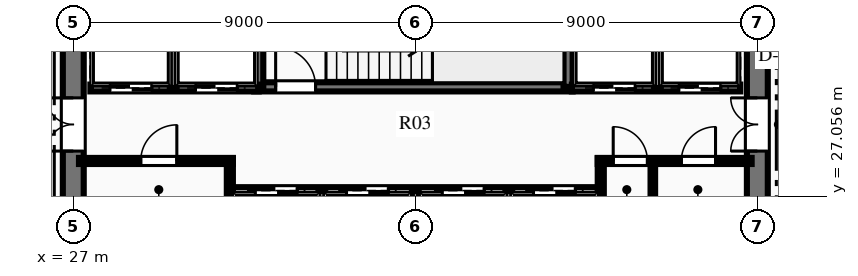
"""IFC4 building model, lengths in metres.
Left out: names, types, materials, properties, quantities, classifications, styles, units other than length and angle.
Written with IfcOpenShell. Run it as: python <this file> out.ifc"""

import sys

from ifc_helpers import new_model, si_unit, direction, frame, frame_2d, origin, place, context, subcontext, project, spatial, rectangle, extrude, element, fill, save


model = new_model("IFC4")
c1 = context("Model", 3, precision=1e-05, world=origin(), true_north=direction((0.0, 1.0)))
c2 = subcontext(c1, "Body", "Model", "MODEL_VIEW")
j1 = project(units=[si_unit("LENGTHUNIT", "METRE"), si_unit("PLANEANGLEUNIT", "RADIAN")], contexts=[c1])
p1 = place(None, origin())
s1 = spatial("IfcSite", under=j1, at=p1, CompositionType="ELEMENT")
p2 = place(p1, origin())
s2 = spatial("IfcBuilding", under=s1, at=p2, CompositionType="ELEMENT")
p3 = place(p2, frame((0.0, 0.0, 127.95)))
s3 = spatial("IfcBuildingStorey", under=s2, at=p3, CompositionType="ELEMENT", Elevation=127.95)
p4 = place(p3, frame((27.0, 18.275, 0.0), z_axis=(0.0, 0.0, 1.0), x_axis=(0.0, 1.0, 0.0)))
e1 = element("IfcWall", 1, at=p4, inside=s3, PredefinedType="SHEAR", context=c2, shape_type="SweptSolid", body=[
    extrude(rectangle(XDim=15.45, YDim=0.55, at=frame_2d((7.725, 0.0))), origin(), (0.0, 0.0, 1.0), 3.75),
])
p5 = place(p4, frame((9.965, 0.0, 0.0)))
e2 = element("IfcOpeningElement", 2, at=p5, cuts=e1, PredefinedType="OPENING", context=c2, shape_type="SweptSolid", body=[
    extrude(rectangle(XDim=1.4, YDim=2.2, at=frame_2d((0.7, 1.1))), frame((0.0, 0.285, 0.0), z_axis=(0.0, -1.0, 0.0), x_axis=(1.0, 0.0, 0.0)), (0.0, 0.0, 1.0), 0.57),
])
p6 = place(p3, frame((45.0, 18.275, 0.0), z_axis=(0.0, 0.0, 1.0), x_axis=(0.0, 1.0, 0.0)))
e3 = element("IfcWall", 3, at=p6, inside=s3, PredefinedType="SHEAR", context=c2, shape_type="SweptSolid", body=[
    extrude(rectangle(XDim=15.45, YDim=0.55, at=frame_2d((7.725, 0.0))), origin(), (0.0, 0.0, 1.0), 3.75),
])
p7 = place(p6, frame((9.965, 0.0, 0.0)))
e4 = element("IfcOpeningElement", 4, at=p7, cuts=e3, PredefinedType="OPENING", context=c2, shape_type="SweptSolid", body=[
    extrude(rectangle(XDim=1.4, YDim=2.2, at=frame_2d((0.7, 1.1))), frame((0.0, 0.285, 0.0), z_axis=(0.0, -1.0, 0.0), x_axis=(1.0, 0.0, 0.0)), (0.0, 0.0, 1.0), 0.57),
])
p8 = place(p3, frame((31.76, 29.93, 0.0), z_axis=(0.0, 0.0, 1.0), x_axis=(1.0, 0.0, 0.0)))
e5 = element("IfcWall", 5, at=p8, inside=s3, PredefinedType="SHEAR", context=c2, shape_type="SweptSolid", body=[
    extrude(rectangle(XDim=8.38, YDim=0.24, at=frame_2d((4.19, 0.0))), origin(), (0.0, 0.0, 1.0), 3.75),
])
p9 = place(p8, frame((0.565, 0.0, 0.0)))
e6 = element("IfcOpeningElement", 6, at=p9, cuts=e5, PredefinedType="OPENING", context=c2, shape_type="SweptSolid", body=[
    extrude(rectangle(XDim=1.05, YDim=2.15, at=frame_2d((0.525, 1.075))), frame((0.0, 0.13, 0.0), z_axis=(0.0, -1.0, 0.0), x_axis=(1.0, 0.0, 0.0)), (0.0, 0.0, 1.0), 0.26),
])
p10 = place(p3, frame((31.88, 29.93, 0.0), z_axis=(0.0, 0.0, 1.0), x_axis=(0.0, 1.0, 0.0)))
e7 = element("IfcWall", 7, at=p10, inside=s3, PredefinedType="SHEAR", context=c2, shape_type="SweptSolid", body=[
    extrude(rectangle(XDim=3.79, YDim=0.24, at=frame_2d((1.895, 0.0))), origin(), (0.0, 0.0, 1.0), 3.75),
])
p11 = place(p3, frame((40.02, 29.93, 0.0), z_axis=(0.0, 0.0, 1.0), x_axis=(0.0, 1.0, 0.0)))
e8 = element("IfcWall", 8, at=p11, inside=s3, PredefinedType="SHEAR", context=c2, shape_type="SweptSolid", body=[
    extrude(rectangle(XDim=3.85, YDim=0.24, at=frame_2d((1.925, 0.0))), origin(), (0.0, 0.0, 1.0), 3.75),
])
p12 = place(p3, frame((27.15, 27.98, 0.0), z_axis=(0.0, 0.0, 1.0), x_axis=(1.0, 0.0, 0.0)))
e9 = element("IfcWall", 9, at=p12, inside=s3, PredefinedType="PARTITIONING", context=c2, shape_type="SweptSolid", body=[
    extrude(rectangle(XDim=4.05, YDim=0.16, at=frame_2d((2.025, 0.0))), origin(), (0.0, 0.0, 1.0), 3.4),
])
p13 = place(p12, frame((1.625, 0.0, 0.0)))
e10 = element("IfcOpeningElement", 10, at=p13, cuts=e9, PredefinedType="OPENING", context=c2, shape_type="SweptSolid", body=[
    extrude(rectangle(XDim=0.95, YDim=2.15, at=frame_2d((0.475, 1.075))), frame((0.0, 0.09, 0.0), z_axis=(0.0, -1.0, 0.0), x_axis=(1.0, 0.0, 0.0)), (0.0, 0.0, 1.0), 0.18),
])
p14 = place(p3, frame((31.12, 26.54, 0.0), z_axis=(0.0, 0.0, 1.0), x_axis=(0.0, 1.0, 0.0)))
e11 = element("IfcWall", 11, at=p14, inside=s3, PredefinedType="PARTITIONING", context=c2, shape_type="SweptSolid", body=[
    extrude(rectangle(XDim=1.51, YDim=0.16, at=frame_2d((0.755, 0.0))), origin(), (0.0, 0.0, 1.0), 3.4),
])
p15 = place(p3, frame((40.8, 27.98, 0.0), z_axis=(0.0, 0.0, 1.0), x_axis=(1.0, 0.0, 0.0)))
e12 = element("IfcWall", 12, at=p15, inside=s3, PredefinedType="PARTITIONING", context=c2, shape_type="SweptSolid", body=[
    extrude(rectangle(XDim=4.05, YDim=0.16, at=frame_2d((2.025, 0.0))), origin(), (0.0, 0.0, 1.0), 3.4),
])
p16 = place(p15, frame((0.407, 0.0, 0.0)))
e13 = element("IfcOpeningElement", 13, at=p16, cuts=e12, PredefinedType="OPENING", context=c2, shape_type="SweptSolid", body=[
    extrude(rectangle(XDim=0.9, YDim=2.15, at=frame_2d((0.45, 1.075))), frame((0.0, 0.09, 0.0), z_axis=(0.0, -1.0, 0.0), x_axis=(1.0, 0.0, 0.0)), (0.0, 0.0, 1.0), 0.18),
])
p17 = place(p15, frame((2.2, 0.0, 0.0)))
e14 = element("IfcOpeningElement", 14, at=p17, cuts=e12, PredefinedType="OPENING", context=c2, shape_type="SweptSolid", body=[
    extrude(rectangle(XDim=0.9, YDim=2.15, at=frame_2d((0.45, 1.075))), frame((0.0, 0.09, 0.0), z_axis=(0.0, -1.0, 0.0), x_axis=(1.0, 0.0, 0.0)), (0.0, 0.0, 1.0), 0.18),
])
p18 = place(p3, frame((40.88, 26.54, 0.0), z_axis=(0.0, 0.0, 1.0), x_axis=(0.0, 1.0, 0.0)))
e15 = element("IfcWall", 15, at=p18, inside=s3, PredefinedType="PARTITIONING", context=c2, shape_type="SweptSolid", body=[
    extrude(rectangle(XDim=1.51, YDim=0.16, at=frame_2d((0.755, 0.0))), origin(), (0.0, 0.0, 1.0), 3.4),
])
p19 = place(p3, frame((42.25, 26.54, 0.0), z_axis=(0.0, 0.0, 1.0), x_axis=(0.0, 1.0, 0.0)))
e16 = element("IfcWall", 16, at=p19, inside=s3, PredefinedType="PARTITIONING", context=c2, shape_type="SweptSolid", body=[
    extrude(rectangle(XDim=1.44, YDim=0.12, at=frame_2d((0.72, 0.0))), origin(), (0.0, 0.0, 1.0), 3.4),
])
p20 = place(p3, frame((27.45, 29.9, 0.0), z_axis=(0.0, 0.0, 1.0), x_axis=(1.0, 0.0, 0.0)))
e17 = element("IfcWall", 17, at=p20, inside=s3, PredefinedType="PARTITIONING", context=c2, shape_type="SweptSolid", body=[
    extrude(rectangle(XDim=4.43, YDim=0.18, at=frame_2d((2.215, 0.0))), origin(), (0.0, 0.0, 1.0), 3.4),
])
p21 = place(p20, frame((0.515, 0.0, 0.0)))
e18 = element("IfcOpeningElement", 18, at=p21, cuts=e17, PredefinedType="OPENING", context=c2, shape_type="SweptSolid", body=[
    extrude(rectangle(XDim=1.1, YDim=2.15, at=frame_2d((0.55, 1.075))), frame((0.0, 0.1, 0.0), z_axis=(0.0, -1.0, 0.0), x_axis=(1.0, 0.0, 0.0)), (0.0, 0.0, 1.0), 0.2),
])
p22 = place(p20, frame((2.765, 0.0, 0.0)))
e19 = element("IfcOpeningElement", 19, at=p22, cuts=e17, PredefinedType="OPENING", context=c2, shape_type="SweptSolid", body=[
    extrude(rectangle(XDim=1.1, YDim=2.15, at=frame_2d((0.55, 1.075))), frame((0.0, 0.1, 0.0), z_axis=(0.0, -1.0, 0.0), x_axis=(1.0, 0.0, 0.0)), (0.0, 0.0, 1.0), 0.2),
])
p23 = place(p3, frame((29.63, 29.9, 0.0), z_axis=(0.0, 0.0, 1.0), x_axis=(0.0, 1.0, 0.0)))
e20 = element("IfcWall", 20, at=p23, inside=s3, PredefinedType="PARTITIONING", context=c2, shape_type="SweptSolid", body=[
    extrude(rectangle(XDim=3.75, YDim=0.18, at=frame_2d((1.875, 0.0))), origin(), (0.0, 0.0, 1.0), 3.4),
])
p24 = place(p3, frame((40.12, 29.9, 0.0), z_axis=(0.0, 0.0, 1.0), x_axis=(1.0, 0.0, 0.0)))
e21 = element("IfcWall", 21, at=p24, inside=s3, PredefinedType="PARTITIONING", context=c2, shape_type="SweptSolid", body=[
    extrude(rectangle(XDim=4.43, YDim=0.18, at=frame_2d((2.215, 0.0))), origin(), (0.0, 0.0, 1.0), 3.4),
])
p25 = place(p24, frame((0.565, 0.0, 0.0)))
e22 = element("IfcOpeningElement", 22, at=p25, cuts=e21, PredefinedType="OPENING", context=c2, shape_type="SweptSolid", body=[
    extrude(rectangle(XDim=1.1, YDim=2.15, at=frame_2d((0.55, 1.075))), frame((0.0, 0.1, 0.0), z_axis=(0.0, -1.0, 0.0), x_axis=(1.0, 0.0, 0.0)), (0.0, 0.0, 1.0), 0.2),
])
p26 = place(p24, frame((2.815, 0.0, 0.0)))
e23 = element("IfcOpeningElement", 23, at=p26, cuts=e21, PredefinedType="OPENING", context=c2, shape_type="SweptSolid", body=[
    extrude(rectangle(XDim=1.1, YDim=2.15, at=frame_2d((0.55, 1.075))), frame((0.0, 0.1, 0.0), z_axis=(0.0, -1.0, 0.0), x_axis=(1.0, 0.0, 0.0)), (0.0, 0.0, 1.0), 0.2),
])
p27 = place(p3, frame((42.37, 29.9, 0.0), z_axis=(0.0, 0.0, 1.0), x_axis=(0.0, 1.0, 0.0)))
e24 = element("IfcWall", 24, at=p27, inside=s3, PredefinedType="PARTITIONING", context=c2, shape_type="SweptSolid", body=[
    extrude(rectangle(XDim=3.75, YDim=0.18, at=frame_2d((1.875, 0.0))), origin(), (0.0, 0.0, 1.0), 3.4),
])
p28 = place(p3, frame((31.2, 27.2, 0.0), z_axis=(0.0, 0.0, 1.0), x_axis=(1.0, 0.0, 0.0)))
e25 = element("IfcWall", 25, at=p28, inside=s3, PredefinedType="PARTITIONING", context=c2, shape_type="SweptSolid", body=[
    extrude(rectangle(XDim=9.6, YDim=0.18, at=frame_2d((4.8, 0.0))), origin(), (0.0, 0.0, 1.0), 3.4),
])
p29 = place(p28, frame((0.59, 0.0, 0.0)))
e26 = element("IfcOpeningElement", 26, at=p29, cuts=e25, PredefinedType="OPENING", context=c2, shape_type="SweptSolid", body=[
    extrude(rectangle(XDim=1.1, YDim=2.15, at=frame_2d((0.55, 1.075))), frame((0.0, 0.1, 0.0), z_axis=(0.0, -1.0, 0.0), x_axis=(1.0, 0.0, 0.0)), (0.0, 0.0, 1.0), 0.2),
])
p30 = place(p28, frame((2.99, 0.0, 0.0)))
e27 = element("IfcOpeningElement", 27, at=p30, cuts=e25, PredefinedType="OPENING", context=c2, shape_type="SweptSolid", body=[
    extrude(rectangle(XDim=1.1, YDim=2.15, at=frame_2d((0.55, 1.075))), frame((0.0, 0.1, 0.0), z_axis=(0.0, -1.0, 0.0), x_axis=(1.0, 0.0, 0.0)), (0.0, 0.0, 1.0), 0.2),
])
p31 = place(p28, frame((5.51, 0.0, 0.0)))
e28 = element("IfcOpeningElement", 28, at=p31, cuts=e25, PredefinedType="OPENING", context=c2, shape_type="SweptSolid", body=[
    extrude(rectangle(XDim=1.1, YDim=2.15, at=frame_2d((0.55, 1.075))), frame((0.0, 0.1, 0.0), z_axis=(0.0, -1.0, 0.0), x_axis=(1.0, 0.0, 0.0)), (0.0, 0.0, 1.0), 0.2),
])
p32 = place(p28, frame((7.91, 0.0, 0.0)))
e29 = element("IfcOpeningElement", 29, at=p32, cuts=e25, PredefinedType="OPENING", context=c2, shape_type="SweptSolid", body=[
    extrude(rectangle(XDim=1.1, YDim=2.15, at=frame_2d((0.55, 1.075))), frame((0.0, 0.1, 0.0), z_axis=(0.0, -1.0, 0.0), x_axis=(1.0, 0.0, 0.0)), (0.0, 0.0, 1.0), 0.2),
])
for number, where, z_axis, x_axis in (
    (30, (33.54, 25.3, 0.0), (0.0, 0.0, 1.0), (0.0, 1.0, 0.0)),
    (31, (36.0, 25.3, 0.0), (0.0, 0.0, 1.0), (0.0, 1.0, 0.0)),
    (32, (38.46, 25.3, 0.0), (0.0, 0.0, 1.0), (0.0, 1.0, 0.0)),
):
    element("IfcWall", number, at=place(p3, frame(where, z_axis=z_axis, x_axis=x_axis)), inside=s3, PredefinedType="PARTITIONING", context=c2, shape_type="SweptSolid", body=[
        extrude(rectangle(XDim=1.9, YDim=0.18, at=frame_2d((0.95, 0.0))), origin(), (0.0, 0.0, 1.0), 3.4),
    ])
p33 = place(p13, origin())
e33 = element("IfcDoor", 33, at=p33, inside=s3, OperationType="SINGLE_SWING_RIGHT", PredefinedType="DOOR", context=c2, shape_type="SweptSolid", body=[
    extrude(rectangle(XDim=0.95, YDim=2.15, at=frame_2d((0.475, 1.075))), frame((0.0, 0.025, 0.0), z_axis=(0.0, -1.0, 0.0), x_axis=(1.0, 0.0, 0.0)), (0.0, 0.0, 1.0), 0.05),
])
fill(e10, e33)
p34 = place(p16, origin())
e34 = element("IfcDoor", 34, at=p34, inside=s3, OperationType="SINGLE_SWING_LEFT", PredefinedType="DOOR", context=c2, shape_type="SweptSolid", body=[
    extrude(rectangle(XDim=0.9, YDim=2.15, at=frame_2d((0.45, 1.075))), frame((0.0, 0.025, 0.0), z_axis=(0.0, -1.0, 0.0), x_axis=(1.0, 0.0, 0.0)), (0.0, 0.0, 1.0), 0.05),
])
fill(e13, e34)
p35 = place(p17, origin())
e35 = element("IfcDoor", 35, at=p35, inside=s3, OperationType="SINGLE_SWING_RIGHT", PredefinedType="DOOR", context=c2, shape_type="SweptSolid", body=[
    extrude(rectangle(XDim=0.9, YDim=2.15, at=frame_2d((0.45, 1.075))), frame((0.0, 0.025, 0.0), z_axis=(0.0, -1.0, 0.0), x_axis=(1.0, 0.0, 0.0)), (0.0, 0.0, 1.0), 0.05),
])
fill(e14, e35)
p36 = place(p9, origin())
e36 = element("IfcDoor", 36, at=p36, inside=s3, OperationType="SINGLE_SWING_LEFT", PredefinedType="DOOR", context=c2, shape_type="SweptSolid", body=[
    extrude(rectangle(XDim=1.05, YDim=2.15, at=frame_2d((0.525, 1.075))), frame((0.0, 0.025, 0.0), z_axis=(0.0, -1.0, 0.0), x_axis=(1.0, 0.0, 0.0)), (0.0, 0.0, 1.0), 0.05),
])
fill(e6, e36)
p37 = place(p5, origin())
e37 = element("IfcDoor", 37, at=p37, inside=s3, OperationType="DOUBLE_DOOR_SINGLE_SWING", PredefinedType="DOOR", context=c2, shape_type="SweptSolid", body=[
    extrude(rectangle(XDim=1.4, YDim=2.2, at=frame_2d((0.7, 1.1))), frame((0.0, 0.025, 0.0), z_axis=(0.0, -1.0, 0.0), x_axis=(1.0, 0.0, 0.0)), (0.0, 0.0, 1.0), 0.05),
])
fill(e2, e37)
p38 = place(p7, origin())
e38 = element("IfcDoor", 38, at=p38, inside=s3, OperationType="DOUBLE_DOOR_SINGLE_SWING", PredefinedType="DOOR", context=c2, shape_type="SweptSolid", body=[
    extrude(rectangle(XDim=1.4, YDim=2.2, at=frame_2d((0.7, 1.1))), frame((0.0, 0.025, 0.0), z_axis=(0.0, -1.0, 0.0), x_axis=(1.0, 0.0, 0.0)), (0.0, 0.0, 1.0), 0.05),
])
fill(e4, e38)
p39 = place(p21, origin())
e39 = element("IfcDoor", 39, at=p39, inside=s3, OperationType="SLIDING_TO_LEFT", PredefinedType="DOOR", context=c2, shape_type="SweptSolid", body=[
    extrude(rectangle(XDim=1.1, YDim=2.15, at=frame_2d((0.55, 1.075))), frame((0.0, 0.025, 0.0), z_axis=(0.0, -1.0, 0.0), x_axis=(1.0, 0.0, 0.0)), (0.0, 0.0, 1.0), 0.05),
])
fill(e18, e39)
p40 = place(p22, origin())
e40 = element("IfcDoor", 40, at=p40, inside=s3, OperationType="SLIDING_TO_LEFT", PredefinedType="DOOR", context=c2, shape_type="SweptSolid", body=[
    extrude(rectangle(XDim=1.1, YDim=2.15, at=frame_2d((0.55, 1.075))), frame((0.0, 0.025, 0.0), z_axis=(0.0, -1.0, 0.0), x_axis=(1.0, 0.0, 0.0)), (0.0, 0.0, 1.0), 0.05),
])
fill(e19, e40)
p41 = place(p25, origin())
e41 = element("IfcDoor", 41, at=p41, inside=s3, OperationType="SLIDING_TO_LEFT", PredefinedType="DOOR", context=c2, shape_type="SweptSolid", body=[
    extrude(rectangle(XDim=1.1, YDim=2.15, at=frame_2d((0.55, 1.075))), frame((0.0, 0.025, 0.0), z_axis=(0.0, -1.0, 0.0), x_axis=(1.0, 0.0, 0.0)), (0.0, 0.0, 1.0), 0.05),
])
fill(e22, e41)
p42 = place(p26, origin())
e42 = element("IfcDoor", 42, at=p42, inside=s3, OperationType="SLIDING_TO_LEFT", PredefinedType="DOOR", context=c2, shape_type="SweptSolid", body=[
    extrude(rectangle(XDim=1.1, YDim=2.15, at=frame_2d((0.55, 1.075))), frame((0.0, 0.025, 0.0), z_axis=(0.0, -1.0, 0.0), x_axis=(1.0, 0.0, 0.0)), (0.0, 0.0, 1.0), 0.05),
])
fill(e23, e42)
p43 = place(p29, origin())
e43 = element("IfcDoor", 43, at=p43, inside=s3, OperationType="SLIDING_TO_LEFT", PredefinedType="DOOR", context=c2, shape_type="SweptSolid", body=[
    extrude(rectangle(XDim=1.1, YDim=2.15, at=frame_2d((0.55, 1.075))), frame((0.0, 0.025, 0.0), z_axis=(0.0, -1.0, 0.0), x_axis=(1.0, 0.0, 0.0)), (0.0, 0.0, 1.0), 0.05),
])
fill(e26, e43)
p44 = place(p30, origin())
e44 = element("IfcDoor", 44, at=p44, inside=s3, OperationType="SLIDING_TO_LEFT", PredefinedType="DOOR", context=c2, shape_type="SweptSolid", body=[
    extrude(rectangle(XDim=1.1, YDim=2.15, at=frame_2d((0.55, 1.075))), frame((0.0, 0.025, 0.0), z_axis=(0.0, -1.0, 0.0), x_axis=(1.0, 0.0, 0.0)), (0.0, 0.0, 1.0), 0.05),
])
fill(e27, e44)
p45 = place(p31, origin())
e45 = element("IfcDoor", 45, at=p45, inside=s3, OperationType="SLIDING_TO_LEFT", PredefinedType="DOOR", context=c2, shape_type="SweptSolid", body=[
    extrude(rectangle(XDim=1.1, YDim=2.15, at=frame_2d((0.55, 1.075))), frame((0.0, 0.025, 0.0), z_axis=(0.0, -1.0, 0.0), x_axis=(1.0, 0.0, 0.0)), (0.0, 0.0, 1.0), 0.05),
])
fill(e28, e45)
p46 = place(p32, origin())
e46 = element("IfcDoor", 46, at=p46, inside=s3, OperationType="SLIDING_TO_LEFT", PredefinedType="DOOR", context=c2, shape_type="SweptSolid", body=[
    extrude(rectangle(XDim=1.1, YDim=2.15, at=frame_2d((0.55, 1.075))), frame((0.0, 0.025, 0.0), z_axis=(0.0, -1.0, 0.0), x_axis=(1.0, 0.0, 0.0)), (0.0, 0.0, 1.0), 0.05),
])
fill(e29, e46)
save(model, sys.argv[1])
